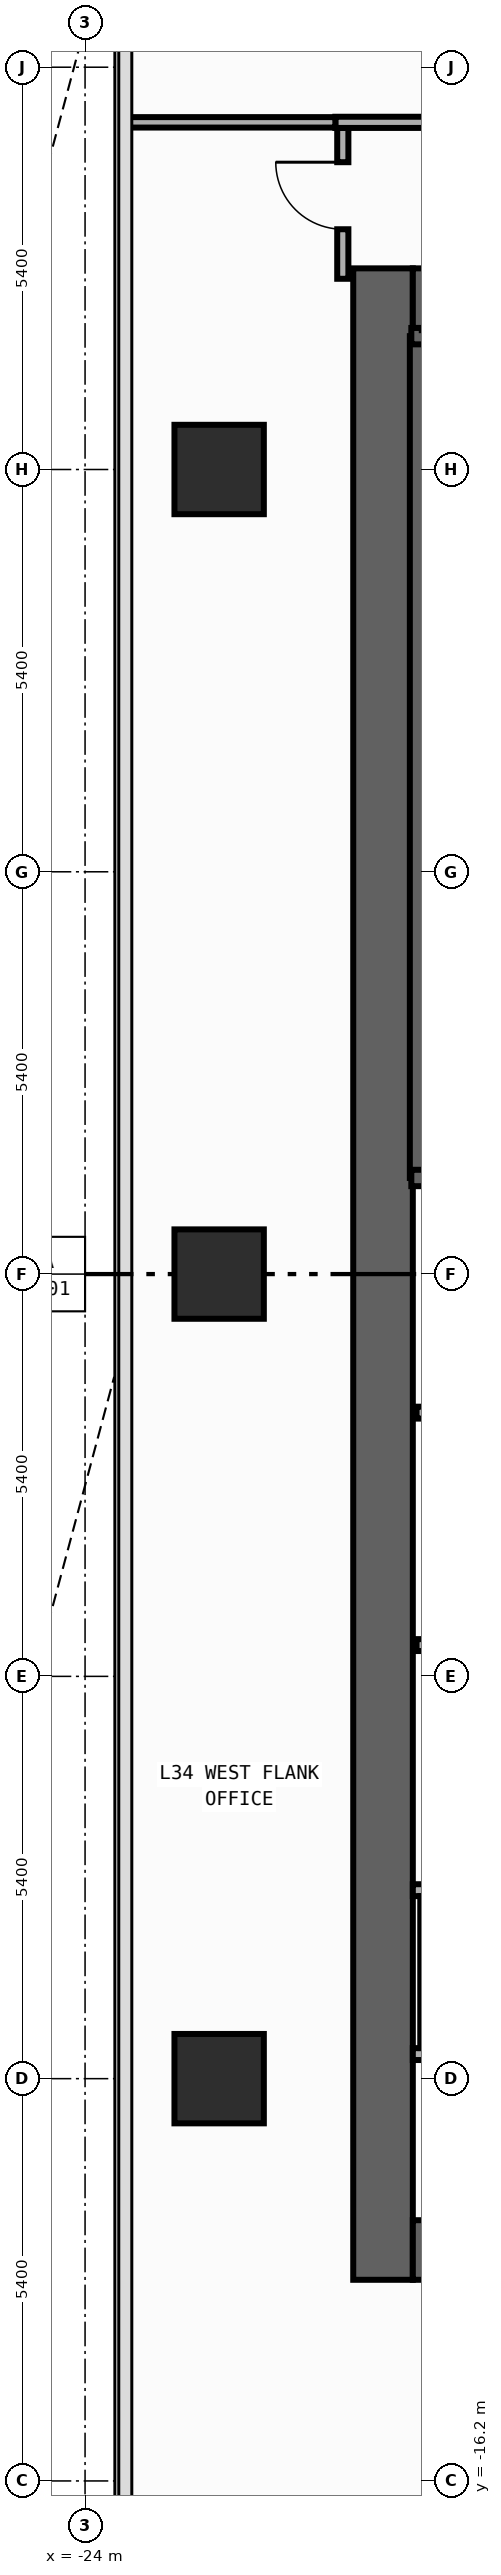
"""IFC4 building model, lengths in metres.
Left out: names, types, materials, properties, quantities, classifications, styles, units other than length and angle.
Written with IfcOpenShell. Run it as: python <this file> out.ifc"""

import sys

from ifc_helpers import new_model, si_unit, direction, frame, frame_2d, origin, origin_2d, place, context, subcontext, project, spatial, rectangle, extrude, element, fill, save


model = new_model("IFC4")
c1 = context("Model", 3, precision=1e-05, world=origin(), true_north=direction((0.0, 1.0)))
c2 = subcontext(c1, "Body", "Model", "MODEL_VIEW")
j1 = project(units=[si_unit("LENGTHUNIT", "METRE"), si_unit("PLANEANGLEUNIT", "RADIAN")], contexts=[c1])
p1 = place(None, origin())
s1 = spatial("IfcSite", under=j1, at=p1, CompositionType="ELEMENT")
p2 = place(p1, origin())
s2 = spatial("IfcBuilding", under=s1, at=p2, CompositionType="ELEMENT")
p3 = place(p2, frame((0.0, 0.0, 147.8)))
s3 = spatial("IfcBuildingStorey", under=s2, at=p3, CompositionType="ELEMENT", Elevation=147.8)
p4 = place(p3, frame((-20.0, -13.5, 0.0), z_axis=(0.0, 0.0, 1.0), x_axis=(0.0, 1.0, 0.0)))
e1 = element("IfcWall", 1, at=p4, inside=s3, PredefinedType="SHEAR", context=c2, shape_type="SweptSolid", body=[
    extrude(rectangle(XDim=27.0, YDim=0.8, at=frame_2d((13.5, 0.0))), origin(), (0.0, 0.0, 1.0), 3.85),
])
for number, where, z_axis, x_axis in (
    (2, (-19.6, -13.1, 0.0), (0.0, 0.0, 1.0), (1.0, 0.0, 0.0)),
    (3, (-19.6, 13.1, 0.0), (0.0, 0.0, 1.0), (1.0, 0.0, 0.0)),
):
    element("IfcWall", number, at=place(p3, frame(where, z_axis=z_axis, x_axis=x_axis)), inside=s3, PredefinedType="SHEAR", context=c2, shape_type="SweptSolid", body=[
        extrude(rectangle(XDim=6.8, YDim=0.8, at=frame_2d((3.4, 0.0))), origin(), (0.0, 0.0, 1.0), 3.85),
    ])
p5 = place(p3, frame((-19.53, 1.29, 0.0), z_axis=(0.0, 0.0, 1.0), x_axis=(0.0, 1.0, 0.0)))
e4 = element("IfcWall", 4, at=p5, inside=s3, PredefinedType="SHEAR", context=c2, shape_type="SweptSolid", body=[
    extrude(rectangle(XDim=11.3, YDim=0.22, at=frame_2d((5.65, 0.0))), origin(), (0.0, 0.0, 1.0), 3.85),
])
p6 = place(p3, frame((-19.62, 12.59, 0.0), z_axis=(0.0, 0.0, 1.0), x_axis=(1.0, 0.0, 0.0)))
e5 = element("IfcWall", 5, at=p6, inside=s3, PredefinedType="SHEAR", context=c2, shape_type="SweptSolid", body=[
    extrude(rectangle(XDim=3.915, YDim=0.22, at=frame_2d((1.958, 0.0))), origin(), (0.0, 0.0, 1.0), 3.85),
])
p7 = place(p3, frame((-19.62, 1.29, 0.0), z_axis=(0.0, 0.0, 1.0), x_axis=(1.0, 0.0, 0.0)))
e6 = element("IfcWall", 6, at=p7, inside=s3, PredefinedType="SHEAR", context=c2, shape_type="SweptSolid", body=[
    extrude(rectangle(XDim=3.915, YDim=0.22, at=frame_2d((1.958, 0.0))), origin(), (0.0, 0.0, 1.0), 3.85),
])
p8 = place(p7, frame((1.08, 0.0, 0.0)))
e7 = element("IfcOpeningElement", 7, at=p8, cuts=e6, PredefinedType="OPENING", context=c2, shape_type="SweptSolid", body=[
    extrude(rectangle(XDim=1.1, YDim=2.2, at=frame_2d((0.55, 1.1))), frame((0.0, 0.12, 0.0), z_axis=(0.0, -1.0, 0.0), x_axis=(1.0, 0.0, 0.0)), (0.0, 0.0, 1.0), 0.24),
])
for number, where, z_axis, x_axis in (
    (8, (-22.2, -10.8, 0.0), (0.0, 0.0, 1.0), (1.0, 0.0, 0.0)),
    (9, (-22.2, 0.0, 0.0), (0.0, 0.0, 1.0), (1.0, 0.0, 0.0)),
    (10, (-22.2, 10.8, 0.0), (0.0, 0.0, 1.0), (1.0, 0.0, 0.0)),
):
    element("IfcColumn", number, at=place(p3, frame(where, z_axis=z_axis, x_axis=x_axis)), inside=s3, PredefinedType="COLUMN", context=c2, shape_type="SweptSolid", body=[
        extrude(rectangle(XDim=1.2, YDim=1.2, at=origin_2d()), origin(), (0.0, 0.0, 1.0), 4.2),
    ])
p9 = place(p3, frame((-19.55, -1.86, 0.0), z_axis=(0.0, 0.0, 1.0), x_axis=(1.0, 0.0, 0.0)))
e11 = element("IfcWall", 11, at=p9, inside=s3, PredefinedType="STANDARD", context=c2, shape_type="SweptSolid", body=[
    extrude(rectangle(XDim=3.8, YDim=0.16, at=frame_2d((1.9, 0.0))), origin(), (0.0, 0.0, 1.0), 3.85),
])
p10 = place(p9, frame((1.18, 0.0, 0.0)))
e12 = element("IfcOpeningElement", 12, at=p10, cuts=e11, PredefinedType="OPENING", context=c2, shape_type="SweptSolid", body=[
    extrude(rectangle(XDim=1.15, YDim=2.2, at=frame_2d((0.575, 1.1))), frame((0.0, 0.09, 0.0), z_axis=(0.0, -1.0, 0.0), x_axis=(1.0, 0.0, 0.0)), (0.0, 0.0, 1.0), 0.18),
])
p11 = place(p3, frame((-19.55, -4.98, 0.0), z_axis=(0.0, 0.0, 1.0), x_axis=(1.0, 0.0, 0.0)))
e13 = element("IfcWall", 13, at=p11, inside=s3, PredefinedType="STANDARD", context=c2, shape_type="SweptSolid", body=[
    extrude(rectangle(XDim=3.8, YDim=0.16, at=frame_2d((1.9, 0.0))), origin(), (0.0, 0.0, 1.0), 3.85),
])
for number, where, z_axis, x_axis in (
    (14, (-19.6, -10.47, 0.0), (0.0, 0.0, 1.0), (1.0, 0.0, 0.0)),
    (15, (-19.6, -8.27, 0.0), (0.0, 0.0, 1.0), (1.0, 0.0, 0.0)),
):
    element("IfcWall", number, at=place(p3, frame(where, z_axis=z_axis, x_axis=x_axis)), inside=s3, PredefinedType="PARTITIONING", context=c2, shape_type="SweptSolid", body=[
        extrude(rectangle(XDim=2.29, YDim=0.16, at=frame_2d((1.145, 0.0))), origin(), (0.0, 0.0, 1.0), 3.85),
    ])
p12 = place(p3, frame((-20.54, 13.36, 0.0), z_axis=(0.0, 0.0, 1.0), x_axis=(0.0, 1.0, 0.0)))
e16 = element("IfcWall", 16, at=p12, inside=s3, PredefinedType="PARTITIONING", context=c2, shape_type="SweptSolid", body=[
    extrude(rectangle(XDim=2.025, YDim=0.15, at=frame_2d((1.012, 0.0))), origin(), (0.0, 0.0, 1.0), 3.85),
])
p13 = place(p12, frame((0.665, 0.0, 0.0)))
e17 = element("IfcOpeningElement", 17, at=p13, cuts=e16, PredefinedType="OPENING", context=c2, shape_type="SweptSolid", body=[
    extrude(rectangle(XDim=0.9, YDim=2.15, at=frame_2d((0.45, 1.075))), frame((0.0, 0.085, 0.0), z_axis=(0.0, -1.0, 0.0), x_axis=(1.0, 0.0, 0.0)), (0.0, 0.0, 1.0), 0.17),
])
p14 = place(p3, frame((-20.64, 15.46, 0.0), z_axis=(0.0, 0.0, 1.0), x_axis=(1.0, 0.0, 0.0)))
e18 = element("IfcWall", 18, at=p14, inside=s3, PredefinedType="PARTITIONING", context=c2, shape_type="SweptSolid", body=[
    extrude(rectangle(XDim=8.65, YDim=0.15, at=frame_2d((4.325, 0.0))), origin(), (0.0, 0.0, 1.0), 3.85),
])
p15 = place(p14, frame((2.871, 0.0, 0.0)))
e19 = element("IfcOpeningElement", 19, at=p15, cuts=e18, PredefinedType="OPENING", context=c2, shape_type="SweptSolid", body=[
    extrude(rectangle(XDim=0.9, YDim=2.15, at=frame_2d((0.45, 1.075))), frame((0.0, 0.085, 0.0), z_axis=(0.0, -1.0, 0.0), x_axis=(1.0, 0.0, 0.0)), (0.0, 0.0, 1.0), 0.17),
])
p16 = place(p3, frame((-23.455, 15.46, 0.0), z_axis=(0.0, 0.0, 1.0), x_axis=(1.0, 0.0, 0.0)))
e20 = element("IfcWall", 20, at=p16, inside=s3, PredefinedType="PARTITIONING", context=c2, shape_type="SweptSolid", body=[
    extrude(rectangle(XDim=2.815, YDim=0.14, at=frame_2d((1.408, 0.0))), origin(), (0.0, 0.0, 1.0), 3.85),
])
p17 = place(p3, frame((-19.45, -10.39, 0.0), z_axis=(0.0, 0.0, 1.0), x_axis=(0.0, 1.0, 0.0)))
e21 = element("IfcWall", 21, at=p17, inside=s3, PredefinedType="PARTITIONING", context=c2, shape_type="SweptSolid", body=[
    extrude(rectangle(XDim=2.04, YDim=0.1, at=frame_2d((1.02, 0.0))), origin(), (0.0, 0.0, 1.0), 3.85),
])
p18 = place(p13, origin())
e22 = element("IfcDoor", 22, at=p18, inside=s3, OperationType="SINGLE_SWING_RIGHT", PredefinedType="DOOR", context=c2, shape_type="SweptSolid", body=[
    extrude(rectangle(XDim=0.9, YDim=2.15, at=frame_2d((0.45, 1.075))), frame((0.0, 0.025, 0.0), z_axis=(0.0, -1.0, 0.0), x_axis=(1.0, 0.0, 0.0)), (0.0, 0.0, 1.0), 0.05),
])
fill(e17, e22)
save(model, sys.argv[1])
